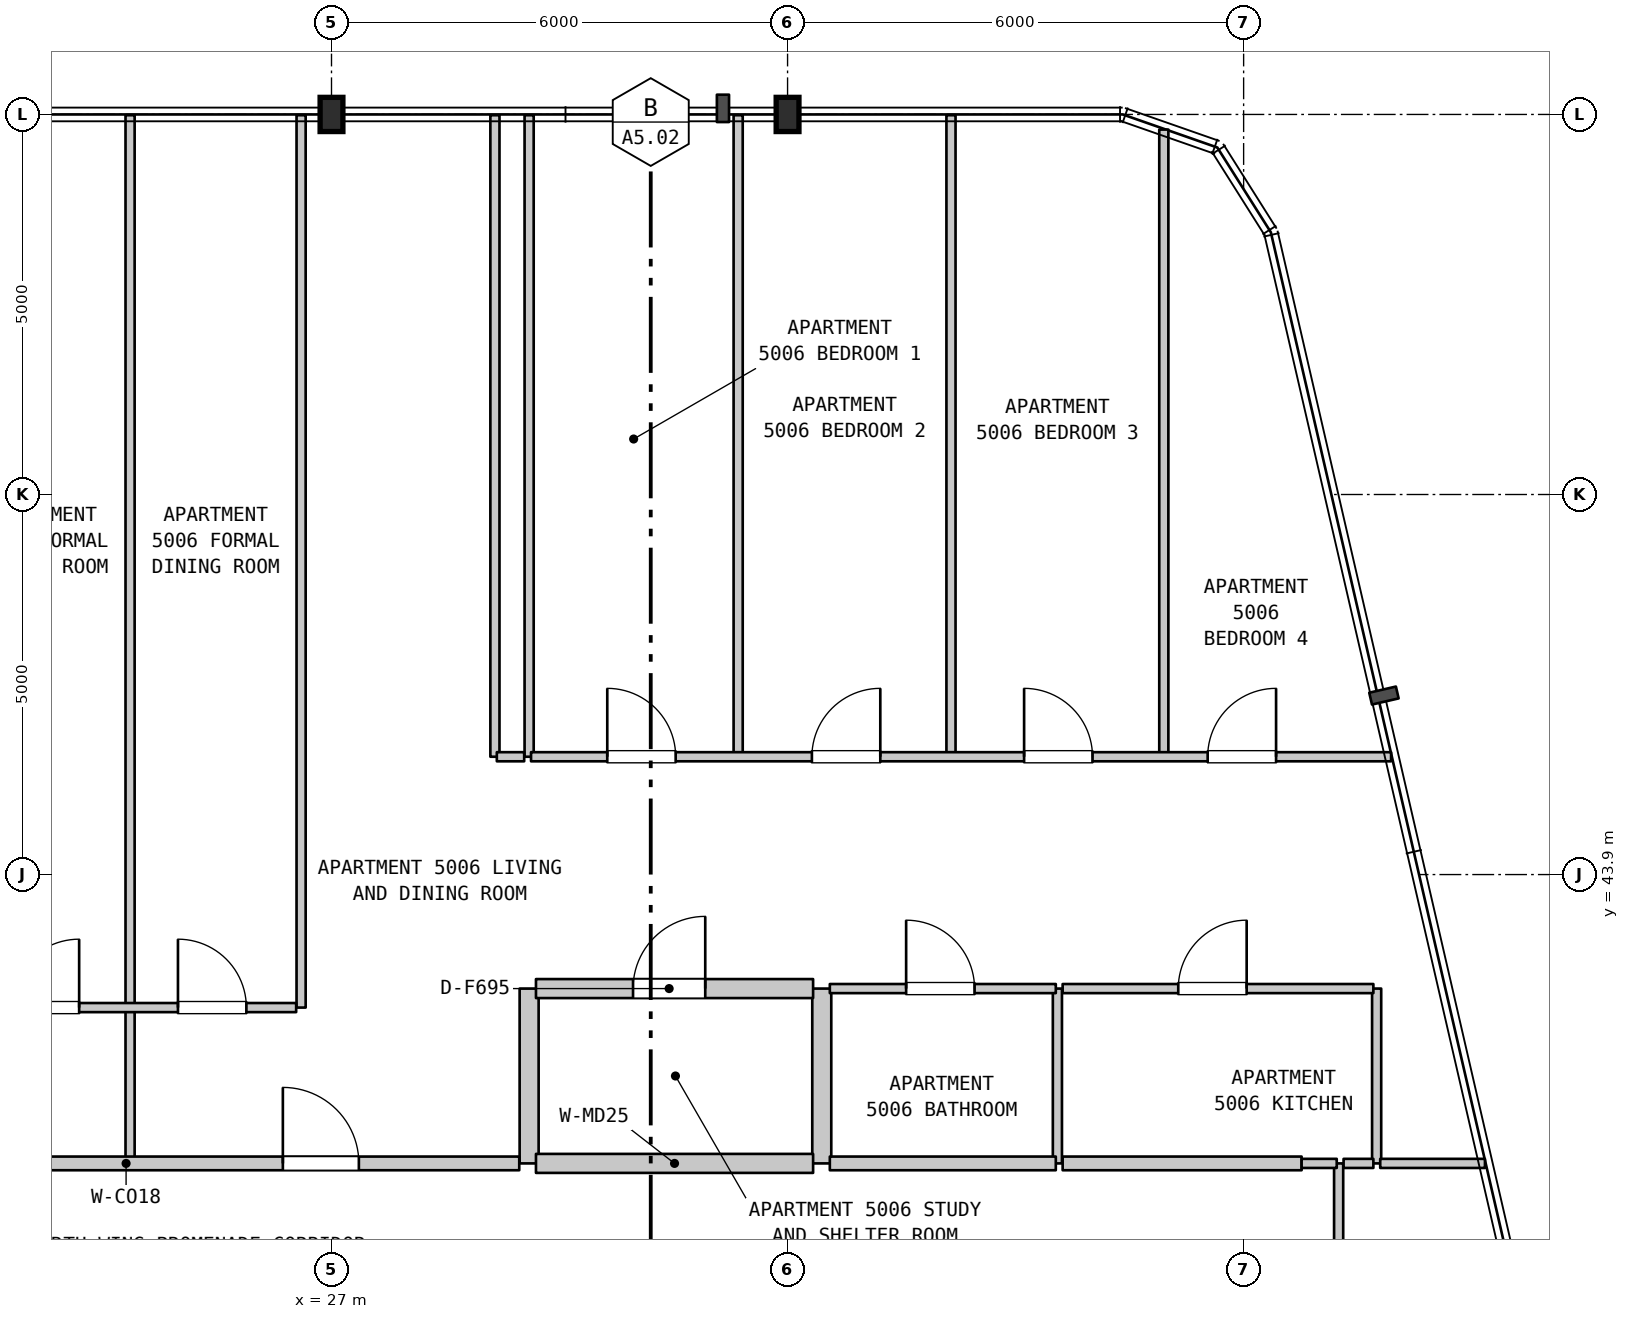
"""IFC4 building model, lengths in metres.
Left out: names, types, materials, properties, quantities, classifications, styles, units other than length and angle.
Written with IfcOpenShell. Run it as: python <this file> out.ifc"""

import sys

from ifc_helpers import new_model, si_unit, direction, frame, frame_2d, origin, origin_2d, place, context, subcontext, project, spatial, rectangle, i_section, extrude, element, fill, save


model = new_model("IFC4")
c1 = context("Model", 3, precision=1e-05, world=origin(), true_north=direction((0.0, 1.0)))
c2 = subcontext(c1, "Body", "Model", "MODEL_VIEW")
j1 = project(units=[si_unit("LENGTHUNIT", "METRE"), si_unit("PLANEANGLEUNIT", "RADIAN")], contexts=[c1])
p1 = place(None, origin())
s1 = spatial("IfcSite", under=j1, at=p1, CompositionType="ELEMENT")
p2 = place(p1, origin())
s2 = spatial("IfcBuilding", under=s1, at=p2, CompositionType="ELEMENT")
p3 = place(p2, frame((0.0, 0.0, 203.2)))
s3 = spatial("IfcBuildingStorey", under=s2, at=p3, CompositionType="ELEMENT", Elevation=203.2)
for number, where, z_axis, x_axis in (
    (1, (27.0, 53.9, 0.0), (0.0, 0.0, 1.0), (1.0, 0.0, 0.0)),
    (2, (33.0, 53.9, 0.0), (0.0, 0.0, 1.0), (1.0, 0.0, 0.0)),
):
    element("IfcColumn", number, at=place(p3, frame(where, z_axis=z_axis, x_axis=x_axis)), inside=s3, PredefinedType="COLUMN", context=c2, shape_type="SweptSolid", body=[
        extrude(i_section(OverallWidth=0.3, OverallDepth=0.45, WebThickness=0.014, FlangeThickness=0.026, FilletRadius=0.027, at=origin_2d()), origin(), (0.0, 0.0, 1.0), 3.7),
    ])
p4 = place(p3, frame((24.35, 40.1, 0.0), z_axis=(0.0, 0.0, 1.0), x_axis=(0.0, 1.0, 0.0)))
e3 = element("IfcWall", 3, at=p4, inside=s3, PredefinedType="PARTITIONING", context=c2, shape_type="SweptSolid", body=[
    extrude(rectangle(XDim=2.05, YDim=0.12, at=frame_2d((1.025, 0.0))), origin(), (0.0, 0.0, 1.0), 3.39),
])
for number, where, z_axis, x_axis in (
    (4, (24.35, 42.15, 0.0), (0.0, 0.0, 1.0), (0.0, 1.0, 0.0)),
    (5, (26.6, 42.15, 0.0), (0.0, 0.0, 1.0), (0.0, 1.0, 0.0)),
):
    element("IfcWall", number, at=place(p3, frame(where, z_axis=z_axis, x_axis=x_axis)), inside=s3, PredefinedType="PARTITIONING", context=c2, shape_type="SweptSolid", body=[
        extrude(rectangle(XDim=11.74, YDim=0.12, at=frame_2d((5.87, 0.0))), origin(), (0.0, 0.0, 1.0), 3.39),
    ])
p5 = place(p3, frame((29.15, 45.45, 0.0), z_axis=(0.0, 0.0, 1.0), x_axis=(0.0, 1.0, 0.0)))
e6 = element("IfcWall", 6, at=p5, inside=s3, PredefinedType="PARTITIONING", context=c2, shape_type="SweptSolid", body=[
    extrude(rectangle(XDim=8.44, YDim=0.12, at=frame_2d((4.22, 0.0))), origin(), (0.0, 0.0, 1.0), 3.39),
])
p6 = place(p3, frame((29.6, 40.1, 0.0), z_axis=(0.0, 0.0, 1.0), x_axis=(0.0, 1.0, 0.0)))
e7 = element("IfcWall", 7, at=p6, inside=s3, PredefinedType="STANDARD", context=c2, shape_type="SweptSolid", body=[
    extrude(rectangle(XDim=2.3, YDim=0.25, at=frame_2d((1.15, 0.0))), origin(), (0.0, 0.0, 1.0), 3.39),
])
for number, where, z_axis, x_axis in (
    (8, (29.6, 45.45, 0.0), (0.0, 0.0, 1.0), (0.0, 1.0, 0.0)),
    (9, (32.35, 45.45, 0.0), (0.0, 0.0, 1.0), (0.0, 1.0, 0.0)),
):
    element("IfcWall", number, at=place(p3, frame(where, z_axis=z_axis, x_axis=x_axis)), inside=s3, PredefinedType="PARTITIONING", context=c2, shape_type="SweptSolid", body=[
        extrude(rectangle(XDim=8.44, YDim=0.12, at=frame_2d((4.22, 0.0))), origin(), (0.0, 0.0, 1.0), 3.39),
    ])
p7 = place(p3, frame((33.45, 40.1, 0.0), z_axis=(0.0, 0.0, 1.0), x_axis=(0.0, 1.0, 0.0)))
e10 = element("IfcWall", 10, at=p7, inside=s3, PredefinedType="STANDARD", context=c2, shape_type="SweptSolid", body=[
    extrude(rectangle(XDim=2.3, YDim=0.25, at=frame_2d((1.15, 0.0))), origin(), (0.0, 0.0, 1.0), 3.39),
])
p8 = place(p3, frame((35.15, 45.45, 0.0), z_axis=(0.0, 0.0, 1.0), x_axis=(0.0, 1.0, 0.0)))
e11 = element("IfcWall", 11, at=p8, inside=s3, PredefinedType="PARTITIONING", context=c2, shape_type="SweptSolid", body=[
    extrude(rectangle(XDim=8.44, YDim=0.12, at=frame_2d((4.22, 0.0))), origin(), (0.0, 0.0, 1.0), 3.39),
])
p9 = place(p3, frame((36.55, 40.1, 0.0), z_axis=(0.0, 0.0, 1.0), x_axis=(0.0, 1.0, 0.0)))
e12 = element("IfcWall", 12, at=p9, inside=s3, PredefinedType="PARTITIONING", context=c2, shape_type="SweptSolid", body=[
    extrude(rectangle(XDim=2.3, YDim=0.12, at=frame_2d((1.15, 0.0))), origin(), (0.0, 0.0, 1.0), 3.39),
])
p10 = place(p3, frame((37.95, 45.45, 0.0), z_axis=(0.0, 0.0, 1.0), x_axis=(0.0, 1.0, 0.0)))
e13 = element("IfcWall", 13, at=p10, inside=s3, PredefinedType="PARTITIONING", context=c2, shape_type="SweptSolid", body=[
    extrude(rectangle(XDim=8.251, YDim=0.12, at=frame_2d((4.125, 0.0))), origin(), (0.0, 0.0, 1.0), 3.39),
])
p11 = place(p3, frame((40.25, 37.9, 0.0), z_axis=(0.0, 0.0, 1.0), x_axis=(0.0, 1.0, 0.0)))
e14 = element("IfcWall", 14, at=p11, inside=s3, PredefinedType="PARTITIONING", context=c2, shape_type="SweptSolid", body=[
    extrude(rectangle(XDim=2.2, YDim=0.12, at=frame_2d((1.1, 0.0))), origin(), (0.0, 0.0, 1.0), 3.39),
])
p12 = place(p3, frame((40.75, 40.1, 0.0), z_axis=(0.0, 0.0, 1.0), x_axis=(0.0, 1.0, 0.0)))
e15 = element("IfcWall", 15, at=p12, inside=s3, PredefinedType="PARTITIONING", context=c2, shape_type="SweptSolid", body=[
    extrude(rectangle(XDim=2.3, YDim=0.12, at=frame_2d((1.15, 0.0))), origin(), (0.0, 0.0, 1.0), 3.39),
])
p13 = place(p3, frame((19.125, 40.1, 0.0), z_axis=(0.0, 0.0, 1.0), x_axis=(1.0, 0.0, 0.0)))
e16 = element("IfcWall", 16, at=p13, inside=s3, PredefinedType="STANDARD", context=c2, shape_type="SweptSolid", body=[
    extrude(rectangle(XDim=10.345, YDim=0.18, at=frame_2d((5.172, 0.0))), origin(), (0.0, 0.0, 1.0), 3.39),
])
p14 = place(p13, frame((2.035, 0.0, 0.0)))
e17 = element("IfcOpeningElement", 17, at=p14, cuts=e16, PredefinedType="OPENING", context=c2, shape_type="SweptSolid", body=[
    extrude(rectangle(XDim=1.0, YDim=2.15, at=frame_2d((0.5, 1.075))), frame((0.0, 0.1, 0.0), z_axis=(0.0, -1.0, 0.0), x_axis=(1.0, 0.0, 0.0)), (0.0, 0.0, 1.0), 0.2),
])
p15 = place(p13, frame((7.235, 0.0, 0.0)))
e18 = element("IfcOpeningElement", 18, at=p15, cuts=e16, PredefinedType="OPENING", context=c2, shape_type="SweptSolid", body=[
    extrude(rectangle(XDim=1.0, YDim=2.15, at=frame_2d((0.5, 1.075))), frame((0.0, 0.1, 0.0), z_axis=(0.0, -1.0, 0.0), x_axis=(1.0, 0.0, 0.0)), (0.0, 0.0, 1.0), 0.2),
])
p16 = place(p3, frame((29.69, 40.1, 0.0), z_axis=(0.0, 0.0, 1.0), x_axis=(1.0, 0.0, 0.0)))
e19 = element("IfcWall", 19, at=p16, inside=s3, PredefinedType="STANDARD", context=c2, shape_type="SweptSolid", body=[
    extrude(rectangle(XDim=3.646, YDim=0.25, at=frame_2d((1.823, 0.0))), origin(), (0.0, 0.0, 1.0), 3.39),
])
p17 = place(p3, frame((33.556, 40.1, 0.0), z_axis=(0.0, 0.0, 1.0), x_axis=(1.0, 0.0, 0.0)))
e20 = element("IfcWall", 20, at=p17, inside=s3, PredefinedType="STANDARD", context=c2, shape_type="SweptSolid", body=[
    extrude(rectangle(XDim=2.973, YDim=0.18, at=frame_2d((1.487, 0.0))), origin(), (0.0, 0.0, 1.0), 3.39),
])
p18 = place(p3, frame((36.619, 40.1, 0.0), z_axis=(0.0, 0.0, 1.0), x_axis=(1.0, 0.0, 0.0)))
e21 = element("IfcWall", 21, at=p18, inside=s3, PredefinedType="STANDARD", context=c2, shape_type="SweptSolid", body=[
    extrude(rectangle(XDim=3.144, YDim=0.18, at=frame_2d((1.572, 0.0))), origin(), (0.0, 0.0, 1.0), 3.39),
])
p19 = place(p3, frame((39.763, 40.1, 0.0), z_axis=(0.0, 0.0, 1.0), x_axis=(1.0, 0.0, 0.0)))
e22 = element("IfcWall", 22, at=p19, inside=s3, PredefinedType="PARTITIONING", context=c2, shape_type="SweptSolid", body=[
    extrude(rectangle(XDim=0.462, YDim=0.12, at=frame_2d((0.231, 0.0))), origin(), (0.0, 0.0, 1.0), 3.39),
])
p20 = place(p3, frame((40.315, 40.1, 0.0), z_axis=(0.0, 0.0, 1.0), x_axis=(1.0, 0.0, 0.0)))
e23 = element("IfcWall", 23, at=p20, inside=s3, PredefinedType="PARTITIONING", context=c2, shape_type="SweptSolid", body=[
    extrude(rectangle(XDim=0.392, YDim=0.12, at=frame_2d((0.196, 0.0))), origin(), (0.0, 0.0, 1.0), 3.39),
])
p21 = place(p3, frame((40.797, 40.1, 0.0), z_axis=(0.0, 0.0, 1.0), x_axis=(1.0, 0.0, 0.0)))
e24 = element("IfcWall", 24, at=p21, inside=s3, PredefinedType="PARTITIONING", context=c2, shape_type="SweptSolid", body=[
    extrude(rectangle(XDim=1.378, YDim=0.12, at=frame_2d((0.689, 0.0))), origin(), (0.0, 0.0, 1.0), 3.39),
])
p22 = place(p3, frame((22.125, 42.15, 0.0), z_axis=(0.0, 0.0, 1.0), x_axis=(1.0, 0.0, 0.0)))
e25 = element("IfcWall", 25, at=p22, inside=s3, PredefinedType="PARTITIONING", context=c2, shape_type="SweptSolid", body=[
    extrude(rectangle(XDim=4.41, YDim=0.12, at=frame_2d((2.205, 0.0))), origin(), (0.0, 0.0, 1.0), 3.39),
])
p23 = place(p22, frame((0.655, 0.0, 0.0)))
e26 = element("IfcOpeningElement", 26, at=p23, cuts=e25, PredefinedType="OPENING", context=c2, shape_type="SweptSolid", body=[
    extrude(rectangle(XDim=0.9, YDim=2.15, at=frame_2d((0.45, 1.075))), frame((0.0, 0.07, 0.0), z_axis=(0.0, -1.0, 0.0), x_axis=(1.0, 0.0, 0.0)), (0.0, 0.0, 1.0), 0.14),
])
p24 = place(p22, frame((2.855, 0.0, 0.0)))
e27 = element("IfcOpeningElement", 27, at=p24, cuts=e25, PredefinedType="OPENING", context=c2, shape_type="SweptSolid", body=[
    extrude(rectangle(XDim=0.9, YDim=2.15, at=frame_2d((0.45, 1.075))), frame((0.0, 0.07, 0.0), z_axis=(0.0, -1.0, 0.0), x_axis=(1.0, 0.0, 0.0)), (0.0, 0.0, 1.0), 0.14),
])
p25 = place(p3, frame((29.69, 42.4, 0.0), z_axis=(0.0, 0.0, 1.0), x_axis=(1.0, 0.0, 0.0)))
e28 = element("IfcWall", 28, at=p25, inside=s3, PredefinedType="STANDARD", context=c2, shape_type="SweptSolid", body=[
    extrude(rectangle(XDim=3.646, YDim=0.25, at=frame_2d((1.823, 0.0))), origin(), (0.0, 0.0, 1.0), 3.39),
])
p26 = place(p25, frame((1.277, 0.0, 0.0)))
e29 = element("IfcOpeningElement", 29, at=p26, cuts=e28, PredefinedType="OPENING", context=c2, shape_type="SweptSolid", body=[
    extrude(rectangle(XDim=0.95, YDim=2.15, at=frame_2d((0.475, 1.075))), frame((0.0, 0.135, 0.0), z_axis=(0.0, -1.0, 0.0), x_axis=(1.0, 0.0, 0.0)), (0.0, 0.0, 1.0), 0.27),
])
p27 = place(p3, frame((33.556, 42.4, 0.0), z_axis=(0.0, 0.0, 1.0), x_axis=(1.0, 0.0, 0.0)))
e30 = element("IfcWall", 30, at=p27, inside=s3, PredefinedType="PARTITIONING", context=c2, shape_type="SweptSolid", body=[
    extrude(rectangle(XDim=2.973, YDim=0.12, at=frame_2d((1.487, 0.0))), origin(), (0.0, 0.0, 1.0), 3.39),
])
p28 = place(p27, frame((1.004, 0.0, 0.0)))
e31 = element("IfcOpeningElement", 31, at=p28, cuts=e30, PredefinedType="OPENING", context=c2, shape_type="SweptSolid", body=[
    extrude(rectangle(XDim=0.9, YDim=2.1, at=frame_2d((0.45, 1.05))), frame((0.0, 0.07, 0.0), z_axis=(0.0, -1.0, 0.0), x_axis=(1.0, 0.0, 0.0)), (0.0, 0.0, 1.0), 0.14),
])
p29 = place(p3, frame((36.619, 42.4, 0.0), z_axis=(0.0, 0.0, 1.0), x_axis=(1.0, 0.0, 0.0)))
e32 = element("IfcWall", 32, at=p29, inside=s3, PredefinedType="PARTITIONING", context=c2, shape_type="SweptSolid", body=[
    extrude(rectangle(XDim=4.088, YDim=0.12, at=frame_2d((2.044, 0.0))), origin(), (0.0, 0.0, 1.0), 3.39),
])
p30 = place(p29, frame((1.521, 0.0, 0.0)))
e33 = element("IfcOpeningElement", 33, at=p30, cuts=e32, PredefinedType="OPENING", context=c2, shape_type="SweptSolid", body=[
    extrude(rectangle(XDim=0.9, YDim=2.15, at=frame_2d((0.45, 1.075))), frame((0.0, 0.07, 0.0), z_axis=(0.0, -1.0, 0.0), x_axis=(1.0, 0.0, 0.0)), (0.0, 0.0, 1.0), 0.14),
])
p31 = place(p3, frame((29.175, 45.45, 0.0), z_axis=(0.0, 0.0, 1.0), x_axis=(1.0, 0.0, 0.0)))
e34 = element("IfcWall", 34, at=p31, inside=s3, PredefinedType="PARTITIONING", context=c2, shape_type="SweptSolid", body=[
    extrude(rectangle(XDim=0.36, YDim=0.12, at=frame_2d((0.18, 0.0))), origin(), (0.0, 0.0, 1.0), 3.39),
])
p32 = place(p3, frame((29.625, 45.45, 0.0), z_axis=(0.0, 0.0, 1.0), x_axis=(1.0, 0.0, 0.0)))
e35 = element("IfcWall", 35, at=p32, inside=s3, PredefinedType="PARTITIONING", context=c2, shape_type="SweptSolid", body=[
    extrude(rectangle(XDim=11.315, YDim=0.12, at=frame_2d((5.657, 0.0))), origin(), (0.0, 0.0, 1.0), 3.39),
])
p33 = place(p32, frame((1.003, 0.0, 0.0)))
e36 = element("IfcOpeningElement", 36, at=p33, cuts=e35, PredefinedType="OPENING", context=c2, shape_type="SweptSolid", body=[
    extrude(rectangle(XDim=0.9, YDim=2.15, at=frame_2d((0.45, 1.075))), frame((0.0, 0.07, 0.0), z_axis=(0.0, -1.0, 0.0), x_axis=(1.0, 0.0, 0.0)), (0.0, 0.0, 1.0), 0.14),
])
p34 = place(p32, frame((3.695, 0.0, 0.0)))
e37 = element("IfcOpeningElement", 37, at=p34, cuts=e35, PredefinedType="OPENING", context=c2, shape_type="SweptSolid", body=[
    extrude(rectangle(XDim=0.9, YDim=2.15, at=frame_2d((0.45, 1.075))), frame((0.0, 0.07, 0.0), z_axis=(0.0, -1.0, 0.0), x_axis=(1.0, 0.0, 0.0)), (0.0, 0.0, 1.0), 0.14),
])
p35 = place(p32, frame((6.487, 0.0, 0.0)))
e38 = element("IfcOpeningElement", 38, at=p35, cuts=e35, PredefinedType="OPENING", context=c2, shape_type="SweptSolid", body=[
    extrude(rectangle(XDim=0.9, YDim=2.15, at=frame_2d((0.45, 1.075))), frame((0.0, 0.07, 0.0), z_axis=(0.0, -1.0, 0.0), x_axis=(1.0, 0.0, 0.0)), (0.0, 0.0, 1.0), 0.14),
])
p36 = place(p32, frame((8.902, 0.0, 0.0)))
e39 = element("IfcOpeningElement", 39, at=p36, cuts=e35, PredefinedType="OPENING", context=c2, shape_type="SweptSolid", body=[
    extrude(rectangle(XDim=0.9, YDim=2.15, at=frame_2d((0.45, 1.075))), frame((0.0, 0.07, 0.0), z_axis=(0.0, -1.0, 0.0), x_axis=(1.0, 0.0, 0.0)), (0.0, 0.0, 1.0), 0.14),
])
p37 = place(p15, origin())
e40 = element("IfcDoor", 40, at=p37, inside=s3, OperationType="SINGLE_SWING_LEFT", PredefinedType="DOOR", context=c2, shape_type="SweptSolid", body=[
    extrude(rectangle(XDim=1.0, YDim=2.15, at=frame_2d((0.5, 1.075))), frame((0.0, 0.025, 0.0), z_axis=(0.0, -1.0, 0.0), x_axis=(1.0, 0.0, 0.0)), (0.0, 0.0, 1.0), 0.05),
])
fill(e18, e40)
p38 = place(p23, origin())
e41 = element("IfcDoor", 41, at=p38, inside=s3, OperationType="SINGLE_SWING_RIGHT", PredefinedType="DOOR", context=c2, shape_type="SweptSolid", body=[
    extrude(rectangle(XDim=0.9, YDim=2.15, at=frame_2d((0.45, 1.075))), frame((0.0, 0.025, 0.0), z_axis=(0.0, -1.0, 0.0), x_axis=(1.0, 0.0, 0.0)), (0.0, 0.0, 1.0), 0.05),
])
fill(e26, e41)
p39 = place(p24, origin())
e42 = element("IfcDoor", 42, at=p39, inside=s3, OperationType="SINGLE_SWING_LEFT", PredefinedType="DOOR", context=c2, shape_type="SweptSolid", body=[
    extrude(rectangle(XDim=0.9, YDim=2.15, at=frame_2d((0.45, 1.075))), frame((0.0, 0.025, 0.0), z_axis=(0.0, -1.0, 0.0), x_axis=(1.0, 0.0, 0.0)), (0.0, 0.0, 1.0), 0.05),
])
fill(e27, e42)
p40 = place(p26, origin())
e43 = element("IfcDoor", 43, at=p40, inside=s3, OperationType="SINGLE_SWING_RIGHT", PredefinedType="DOOR", context=c2, shape_type="SweptSolid", body=[
    extrude(rectangle(XDim=0.95, YDim=2.15, at=frame_2d((0.475, 1.075))), frame((0.0, 0.025, 0.0), z_axis=(0.0, -1.0, 0.0), x_axis=(1.0, 0.0, 0.0)), (0.0, 0.0, 1.0), 0.05),
])
fill(e29, e43)
p41 = place(p28, origin())
e44 = element("IfcDoor", 44, at=p41, inside=s3, OperationType="SINGLE_SWING_LEFT", PredefinedType="DOOR", context=c2, shape_type="SweptSolid", body=[
    extrude(rectangle(XDim=0.9, YDim=2.1, at=frame_2d((0.45, 1.05))), frame((0.0, 0.025, 0.0), z_axis=(0.0, -1.0, 0.0), x_axis=(1.0, 0.0, 0.0)), (0.0, 0.0, 1.0), 0.05),
])
fill(e31, e44)
p42 = place(p30, origin())
e45 = element("IfcDoor", 45, at=p42, inside=s3, OperationType="SINGLE_SWING_RIGHT", PredefinedType="DOOR", context=c2, shape_type="SweptSolid", body=[
    extrude(rectangle(XDim=0.9, YDim=2.15, at=frame_2d((0.45, 1.075))), frame((0.0, 0.025, 0.0), z_axis=(0.0, -1.0, 0.0), x_axis=(1.0, 0.0, 0.0)), (0.0, 0.0, 1.0), 0.05),
])
fill(e33, e45)
p43 = place(p33, origin())
e46 = element("IfcDoor", 46, at=p43, inside=s3, OperationType="SINGLE_SWING_LEFT", PredefinedType="DOOR", context=c2, shape_type="SweptSolid", body=[
    extrude(rectangle(XDim=0.9, YDim=2.15, at=frame_2d((0.45, 1.075))), frame((0.0, 0.025, 0.0), z_axis=(0.0, -1.0, 0.0), x_axis=(1.0, 0.0, 0.0)), (0.0, 0.0, 1.0), 0.05),
])
fill(e36, e46)
p44 = place(p34, origin())
e47 = element("IfcDoor", 47, at=p44, inside=s3, OperationType="SINGLE_SWING_RIGHT", PredefinedType="DOOR", context=c2, shape_type="SweptSolid", body=[
    extrude(rectangle(XDim=0.9, YDim=2.15, at=frame_2d((0.45, 1.075))), frame((0.0, 0.025, 0.0), z_axis=(0.0, -1.0, 0.0), x_axis=(1.0, 0.0, 0.0)), (0.0, 0.0, 1.0), 0.05),
])
fill(e37, e47)
p45 = place(p35, origin())
e48 = element("IfcDoor", 48, at=p45, inside=s3, OperationType="SINGLE_SWING_LEFT", PredefinedType="DOOR", context=c2, shape_type="SweptSolid", body=[
    extrude(rectangle(XDim=0.9, YDim=2.15, at=frame_2d((0.45, 1.075))), frame((0.0, 0.025, 0.0), z_axis=(0.0, -1.0, 0.0), x_axis=(1.0, 0.0, 0.0)), (0.0, 0.0, 1.0), 0.05),
])
fill(e38, e48)
p46 = place(p36, origin())
e49 = element("IfcDoor", 49, at=p46, inside=s3, OperationType="SINGLE_SWING_RIGHT", PredefinedType="DOOR", context=c2, shape_type="SweptSolid", body=[
    extrude(rectangle(XDim=0.9, YDim=2.15, at=frame_2d((0.45, 1.075))), frame((0.0, 0.025, 0.0), z_axis=(0.0, -1.0, 0.0), x_axis=(1.0, 0.0, 0.0)), (0.0, 0.0, 1.0), 0.05),
])
fill(e39, e49)
save(model, sys.argv[1])
